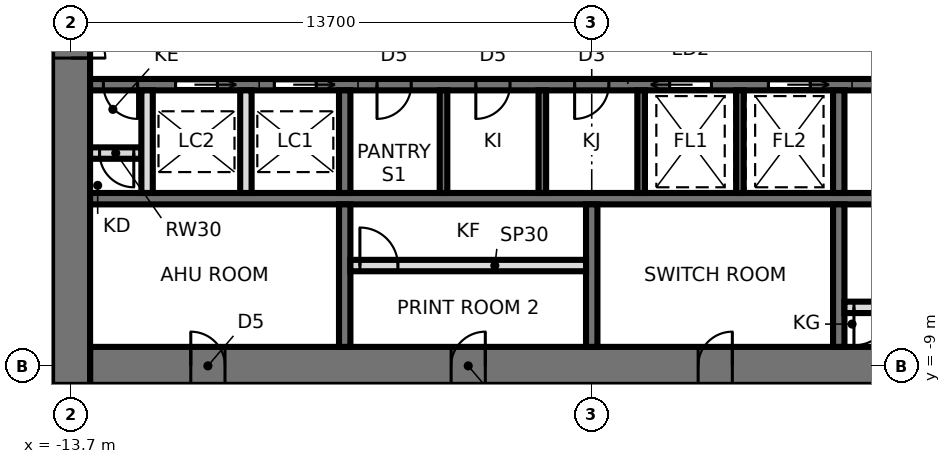
"""IFC4 building model, lengths in metres.
Left out: names, types, materials, properties, quantities, classifications, styles, units other than length and angle.
Written with IfcOpenShell. Run it as: python <this file> out.ifc"""

import sys

from ifc_helpers import new_model, si_unit, direction, frame, frame_2d, origin, place, context, subcontext, project, spatial, rectangle, extrude, element, fill, save


model = new_model("IFC4")
c1 = context("Model", 3, precision=1e-05, world=origin(), true_north=direction((0.0, 1.0)))
c2 = subcontext(c1, "Body", "Model", "MODEL_VIEW")
j1 = project(units=[si_unit("LENGTHUNIT", "METRE"), si_unit("PLANEANGLEUNIT", "RADIAN")], contexts=[c1])
p1 = place(None, origin())
s1 = spatial("IfcSite", under=j1, at=p1, CompositionType="ELEMENT")
p2 = place(p1, origin())
s2 = spatial("IfcBuilding", under=s1, at=p2, CompositionType="ELEMENT")
p3 = place(p2, frame((0.0, 0.0, 176.0)))
s3 = spatial("IfcBuildingStorey", under=s2, at=p3, CompositionType="ELEMENT", Elevation=176.0)
p4 = place(p3, frame((-13.2, -9.0, 0.0), z_axis=(0.0, 0.0, 1.0), x_axis=(1.0, 0.0, 0.0)))
e1 = element("IfcWall", 1, at=p4, inside=s3, PredefinedType="SHEAR", context=c2, shape_type="SweptSolid", body=[
    extrude(rectangle(XDim=26.4, YDim=1.0, at=frame_2d((13.2, 0.0))), origin(), (0.0, 0.0, 1.0), 3.9),
])
p5 = place(p4, frame((2.65, 0.0, 0.0)))
e2 = element("IfcOpeningElement", 2, at=p5, cuts=e1, PredefinedType="OPENING", context=c2, shape_type="SweptSolid", body=[
    extrude(rectangle(XDim=0.9, YDim=2.1, at=frame_2d((0.45, 1.05))), frame((0.0, 0.51, 0.0), z_axis=(0.0, -1.0, 0.0), x_axis=(1.0, 0.0, 0.0)), (0.0, 0.0, 1.0), 1.02),
])
p6 = place(p4, frame((9.5, 0.0, 0.0)))
e3 = element("IfcOpeningElement", 3, at=p6, cuts=e1, PredefinedType="OPENING", context=c2, shape_type="SweptSolid", body=[
    extrude(rectangle(XDim=0.9, YDim=2.1, at=frame_2d((0.45, 1.05))), frame((0.0, 0.51, 0.0), z_axis=(0.0, -1.0, 0.0), x_axis=(1.0, 0.0, 0.0)), (0.0, 0.0, 1.0), 1.02),
])
p7 = place(p4, frame((16.0, 0.0, 0.0)))
e4 = element("IfcOpeningElement", 4, at=p7, cuts=e1, PredefinedType="OPENING", context=c2, shape_type="SweptSolid", body=[
    extrude(rectangle(XDim=0.9, YDim=2.1, at=frame_2d((0.45, 1.05))), frame((0.0, 0.51, 0.0), z_axis=(0.0, -1.0, 0.0), x_axis=(1.0, 0.0, 0.0)), (0.0, 0.0, 1.0), 1.02),
])
p8 = place(p4, frame((22.85, 0.0, 0.0)))
e5 = element("IfcOpeningElement", 5, at=p8, cuts=e1, PredefinedType="OPENING", context=c2, shape_type="SweptSolid", body=[
    extrude(rectangle(XDim=0.9, YDim=2.1, at=frame_2d((0.45, 1.05))), frame((0.0, 0.51, 0.0), z_axis=(0.0, -1.0, 0.0), x_axis=(1.0, 0.0, 0.0)), (0.0, 0.0, 1.0), 1.02),
])
p9 = place(p3, frame((-13.7, 9.5, 0.0), z_axis=(0.0, 0.0, 1.0), x_axis=(0.0, -1.0, 0.0)))
e6 = element("IfcWall", 6, at=p9, inside=s3, PredefinedType="SHEAR", context=c2, shape_type="SweptSolid", body=[
    extrude(rectangle(XDim=19.0, YDim=1.0, at=frame_2d((9.5, 0.0))), origin(), (0.0, 0.0, 1.0), 3.9),
])
p10 = place(p9, frame((8.6, 0.0, 0.0)))
e7 = element("IfcOpeningElement", 7, at=p10, cuts=e6, PredefinedType="OPENING", context=c2, shape_type="SweptSolid", body=[
    extrude(rectangle(XDim=1.8, YDim=2.4, at=frame_2d((0.9, 1.2))), frame((0.0, 0.51, 0.0), z_axis=(0.0, -1.0, 0.0), x_axis=(1.0, 0.0, 0.0)), (0.0, 0.0, 1.0), 1.02),
])
p11 = place(p3, frame((-13.2, -1.6, 0.0), z_axis=(0.0, 0.0, 1.0), x_axis=(1.0, 0.0, 0.0)))
e8 = element("IfcWall", 8, at=p11, inside=s3, PredefinedType="SHEAR", context=c2, shape_type="SweptSolid", body=[
    extrude(rectangle(XDim=26.4, YDim=0.3, at=frame_2d((13.2, 0.0))), origin(), (0.0, 0.0, 1.0), 3.9),
])
p12 = place(p11, frame((25.15, 0.0, 0.0)))
e9 = element("IfcOpeningElement", 9, at=p12, cuts=e8, PredefinedType="OPENING", context=c2, shape_type="SweptSolid", body=[
    extrude(rectangle(XDim=1.0, YDim=2.1, at=frame_2d((0.5, 1.05))), frame((0.0, 0.16, 0.0), z_axis=(0.0, -1.0, 0.0), x_axis=(1.0, 0.0, 0.0)), (0.0, 0.0, 1.0), 0.32),
])
p13 = place(p11, frame((7.55, 0.0, 0.0)))
e10 = element("IfcOpeningElement", 10, at=p13, cuts=e8, PredefinedType="OPENING", context=c2, shape_type="SweptSolid", body=[
    extrude(rectangle(XDim=0.9, YDim=2.1, at=frame_2d((0.45, 1.05))), frame((0.0, 0.16, 0.0), z_axis=(0.0, -1.0, 0.0), x_axis=(1.0, 0.0, 0.0)), (0.0, 0.0, 1.0), 0.32),
])
p14 = place(p11, frame((10.15, 0.0, 0.0)))
e11 = element("IfcOpeningElement", 11, at=p14, cuts=e8, PredefinedType="OPENING", context=c2, shape_type="SweptSolid", body=[
    extrude(rectangle(XDim=0.9, YDim=2.1, at=frame_2d((0.45, 1.05))), frame((0.0, 0.16, 0.0), z_axis=(0.0, -1.0, 0.0), x_axis=(1.0, 0.0, 0.0)), (0.0, 0.0, 1.0), 0.32),
])
p15 = place(p11, frame((12.75, 0.0, 0.0)))
e12 = element("IfcOpeningElement", 12, at=p15, cuts=e8, PredefinedType="OPENING", context=c2, shape_type="SweptSolid", body=[
    extrude(rectangle(XDim=0.9, YDim=2.1, at=frame_2d((0.45, 1.05))), frame((0.0, 0.16, 0.0), z_axis=(0.0, -1.0, 0.0), x_axis=(1.0, 0.0, 0.0)), (0.0, 0.0, 1.0), 0.32),
])
p16 = place(p11, frame((15.25, 0.0, 0.0)))
e13 = element("IfcOpeningElement", 13, at=p16, cuts=e8, PredefinedType="OPENING", context=c2, shape_type="SweptSolid", body=[
    extrude(rectangle(XDim=1.1, YDim=2.3, at=frame_2d((0.55, 1.15))), frame((0.0, 0.16, 0.0), z_axis=(0.0, -1.0, 0.0), x_axis=(1.0, 0.0, 0.0)), (0.0, 0.0, 1.0), 0.32),
])
p17 = place(p11, frame((17.85, 0.0, 0.0)))
e14 = element("IfcOpeningElement", 14, at=p17, cuts=e8, PredefinedType="OPENING", context=c2, shape_type="SweptSolid", body=[
    extrude(rectangle(XDim=1.1, YDim=2.3, at=frame_2d((0.55, 1.15))), frame((0.0, 0.16, 0.0), z_axis=(0.0, -1.0, 0.0), x_axis=(1.0, 0.0, 0.0)), (0.0, 0.0, 1.0), 0.32),
])
p18 = place(p11, frame((4.85, 0.0, 0.0)))
e15 = element("IfcOpeningElement", 15, at=p18, cuts=e8, PredefinedType="OPENING", context=c2, shape_type="SweptSolid", body=[
    extrude(rectangle(XDim=1.1, YDim=2.3, at=frame_2d((0.55, 1.15))), frame((0.0, 0.16, 0.0), z_axis=(0.0, -1.0, 0.0), x_axis=(1.0, 0.0, 0.0)), (0.0, 0.0, 1.0), 0.32),
])
p19 = place(p11, frame((2.25, 0.0, 0.0)))
e16 = element("IfcOpeningElement", 16, at=p19, cuts=e8, PredefinedType="OPENING", context=c2, shape_type="SweptSolid", body=[
    extrude(rectangle(XDim=1.1, YDim=2.3, at=frame_2d((0.55, 1.15))), frame((0.0, 0.16, 0.0), z_axis=(0.0, -1.0, 0.0), x_axis=(1.0, 0.0, 0.0)), (0.0, 0.0, 1.0), 0.32),
])
p20 = place(p11, frame((0.35, 0.0, 0.0)))
e17 = element("IfcOpeningElement", 17, at=p20, cuts=e8, PredefinedType="OPENING", context=c2, shape_type="SweptSolid", body=[
    extrude(rectangle(XDim=0.9, YDim=2.1, at=frame_2d((0.45, 1.05))), frame((0.0, 0.16, 0.0), z_axis=(0.0, -1.0, 0.0), x_axis=(1.0, 0.0, 0.0)), (0.0, 0.0, 1.0), 0.32),
])
p21 = place(p3, frame((-13.2, -4.6, 0.0), z_axis=(0.0, 0.0, 1.0), x_axis=(1.0, 0.0, 0.0)))
e18 = element("IfcWall", 18, at=p21, inside=s3, PredefinedType="SHEAR", context=c2, shape_type="SweptSolid", body=[
    extrude(rectangle(XDim=26.4, YDim=0.3, at=frame_2d((13.2, 0.0))), origin(), (0.0, 0.0, 1.0), 3.9),
])
p22 = place(p3, frame((-6.5, -1.75, 0.0), z_axis=(0.0, 0.0, 1.0), x_axis=(0.0, -1.0, 0.0)))
e19 = element("IfcWall", 19, at=p22, inside=s3, PredefinedType="SHEAR", context=c2, shape_type="SweptSolid", body=[
    extrude(rectangle(XDim=2.7, YDim=0.3, at=frame_2d((1.35, 0.0))), origin(), (0.0, 0.0, 1.0), 3.9),
])
p23 = place(p3, frame((-6.5, -4.75, 0.0), z_axis=(0.0, 0.0, 1.0), x_axis=(0.0, -1.0, 0.0)))
e20 = element("IfcWall", 20, at=p23, inside=s3, PredefinedType="SHEAR", context=c2, shape_type="SweptSolid", body=[
    extrude(rectangle(XDim=3.75, YDim=0.3, at=frame_2d((1.875, 0.0))), origin(), (0.0, 0.0, 1.0), 3.9),
])
p24 = place(p3, frame((6.5, -1.75, 0.0), z_axis=(0.0, 0.0, 1.0), x_axis=(0.0, -1.0, 0.0)))
e21 = element("IfcWall", 21, at=p24, inside=s3, PredefinedType="SHEAR", context=c2, shape_type="SweptSolid", body=[
    extrude(rectangle(XDim=2.7, YDim=0.3, at=frame_2d((1.35, 0.0))), origin(), (0.0, 0.0, 1.0), 3.9),
])
p25 = place(p3, frame((6.5, -4.75, 0.0), z_axis=(0.0, 0.0, 1.0), x_axis=(0.0, -1.0, 0.0)))
e22 = element("IfcWall", 22, at=p25, inside=s3, PredefinedType="SHEAR", context=c2, shape_type="SweptSolid", body=[
    extrude(rectangle(XDim=3.75, YDim=0.3, at=frame_2d((1.875, 0.0))), origin(), (0.0, 0.0, 1.0), 3.9),
])
for number, where, z_axis, x_axis in (
    (23, (-3.9, -1.75, 0.0), (0.0, 0.0, 1.0), (0.0, -1.0, 0.0)),
    (24, (-1.3, -1.75, 0.0), (0.0, 0.0, 1.0), (0.0, -1.0, 0.0)),
    (25, (1.3, -1.75, 0.0), (0.0, 0.0, 1.0), (0.0, -1.0, 0.0)),
    (26, (3.9, -1.75, 0.0), (0.0, 0.0, 1.0), (0.0, -1.0, 0.0)),
):
    element("IfcWall", number, at=place(p3, frame(where, z_axis=z_axis, x_axis=x_axis)), inside=s3, PredefinedType="SHEAR", context=c2, shape_type="SweptSolid", body=[
        extrude(rectangle(XDim=2.7, YDim=0.2, at=frame_2d((1.35, 0.0))), origin(), (0.0, 0.0, 1.0), 3.9),
    ])
p26 = place(p3, frame((0.0, -4.75, 0.0), z_axis=(0.0, 0.0, 1.0), x_axis=(0.0, -1.0, 0.0)))
e27 = element("IfcWall", 27, at=p26, inside=s3, PredefinedType="SHEAR", context=c2, shape_type="SweptSolid", body=[
    extrude(rectangle(XDim=3.75, YDim=0.3, at=frame_2d((1.875, 0.0))), origin(), (0.0, 0.0, 1.0), 3.9),
])
p27 = place(p3, frame((-6.35, -6.36, 0.0), z_axis=(0.0, 0.0, 1.0), x_axis=(1.0, 0.0, 0.0)))
e28 = element("IfcWall", 28, at=p27, inside=s3, PredefinedType="PARTITIONING", context=c2, shape_type="SweptSolid", body=[
    extrude(rectangle(XDim=6.2, YDim=0.3, at=frame_2d((3.1, 0.0))), origin(), (0.0, 0.0, 1.0), 3.74),
])
p28 = place(p27, frame((0.25, 0.0, 0.0)))
e29 = element("IfcOpeningElement", 29, at=p28, cuts=e28, PredefinedType="OPENING", context=c2, shape_type="SweptSolid", body=[
    extrude(rectangle(XDim=1.0, YDim=2.4, at=frame_2d((0.5, 1.2))), frame((0.0, 0.16, 0.0), z_axis=(0.0, -1.0, 0.0), x_axis=(1.0, 0.0, 0.0)), (0.0, 0.0, 1.0), 0.32),
])
p29 = place(p3, frame((6.65, -7.46, 0.0), z_axis=(0.0, 0.0, 1.0), x_axis=(1.0, 0.0, 0.0)))
e30 = element("IfcWall", 30, at=p29, inside=s3, PredefinedType="PARTITIONING", context=c2, shape_type="SweptSolid", body=[
    extrude(rectangle(XDim=6.55, YDim=0.3, at=frame_2d((3.275, 0.0))), origin(), (0.0, 0.0, 1.0), 3.74),
])
p30 = place(p29, frame((0.25, 0.0, 0.0)))
e31 = element("IfcOpeningElement", 31, at=p30, cuts=e30, PredefinedType="OPENING", context=c2, shape_type="SweptSolid", body=[
    extrude(rectangle(XDim=1.0, YDim=2.4, at=frame_2d((0.5, 1.2))), frame((0.0, 0.16, 0.0), z_axis=(0.0, -1.0, 0.0), x_axis=(1.0, 0.0, 0.0)), (0.0, 0.0, 1.0), 0.32),
])
p31 = place(p3, frame((-13.2, -3.4, 0.0), z_axis=(0.0, 0.0, 1.0), x_axis=(1.0, 0.0, 0.0)))
e32 = element("IfcWall", 32, at=p31, inside=s3, PredefinedType="SOLIDWALL", context=c2, shape_type="SweptSolid", body=[
    extrude(rectangle(XDim=1.35, YDim=0.3, at=frame_2d((0.675, 0.0))), origin(), (0.0, 0.0, 1.0), 3.74),
])
p32 = place(p31, frame((0.25, 0.0, 0.0)))
e33 = element("IfcOpeningElement", 33, at=p32, cuts=e32, PredefinedType="OPENING", context=c2, shape_type="SweptSolid", body=[
    extrude(rectangle(XDim=0.9, YDim=2.1, at=frame_2d((0.45, 1.05))), frame((0.0, 0.16, 0.0), z_axis=(0.0, -1.0, 0.0), x_axis=(1.0, 0.0, 0.0)), (0.0, 0.0, 1.0), 0.32),
])
for number, where, z_axis, x_axis in (
    (34, (-9.1, -1.75, 0.0), (0.0, 0.0, 1.0), (0.0, -1.0, 0.0)),
    (35, (-11.7, -1.75, 0.0), (0.0, 0.0, 1.0), (0.0, -1.0, 0.0)),
):
    element("IfcWall", number, at=place(p3, frame(where, z_axis=z_axis, x_axis=x_axis)), inside=s3, PredefinedType="SOLIDWALL", context=c2, shape_type="SweptSolid", body=[
        extrude(rectangle(XDim=2.7, YDim=0.3, at=frame_2d((1.35, 0.0))), origin(), (0.0, 0.0, 1.0), 3.74),
    ])
p33 = place(p10, origin())
e36 = element("IfcDoor", 36, at=p33, inside=s3, OperationType="DOUBLE_DOOR_SINGLE_SWING", PredefinedType="DOOR", context=c2, shape_type="SweptSolid", body=[
    extrude(rectangle(XDim=1.72, YDim=2.36, at=frame_2d((0.9, 1.18))), frame((0.0, 0.025, 0.0), z_axis=(0.0, -1.0, 0.0), x_axis=(1.0, 0.0, 0.0)), (0.0, 0.0, 1.0), 0.05),
    extrude(rectangle(XDim=0.04, YDim=2.4, at=frame_2d((0.02, 1.2))), frame((0.0, 0.25, 0.0), z_axis=(0.0, -1.0, 0.0), x_axis=(1.0, 0.0, 0.0)), (0.0, 0.0, 1.0), 0.5),
    extrude(rectangle(XDim=0.04, YDim=2.4, at=frame_2d((1.78, 1.2))), frame((0.0, 0.25, 0.0), z_axis=(0.0, -1.0, 0.0), x_axis=(1.0, 0.0, 0.0)), (0.0, 0.0, 1.0), 0.5),
    extrude(rectangle(XDim=1.72, YDim=0.04, at=frame_2d((0.9, 2.38))), frame((0.0, 0.25, 0.0), z_axis=(0.0, -1.0, 0.0), x_axis=(1.0, 0.0, 0.0)), (0.0, 0.0, 1.0), 0.5),
])
fill(e7, e36)
p34 = place(p13, frame((0.9, 0.0, 0.0), z_axis=(0.0, 0.0, 1.0), x_axis=(-1.0, 0.0, 0.0)))
e37 = element("IfcDoor", 37, at=p34, inside=s3, OperationType="SINGLE_SWING_RIGHT", PredefinedType="DOOR", context=c2, shape_type="SweptSolid", body=[
    extrude(rectangle(XDim=0.9, YDim=2.1, at=frame_2d((0.45, 1.05))), frame((0.0, 0.025, 0.0), z_axis=(0.0, -1.0, 0.0), x_axis=(1.0, 0.0, 0.0)), (0.0, 0.0, 1.0), 0.05),
])
fill(e10, e37)
p35 = place(p14, frame((0.9, 0.0, 0.0), z_axis=(0.0, 0.0, 1.0), x_axis=(-1.0, 0.0, 0.0)))
e38 = element("IfcDoor", 38, at=p35, inside=s3, OperationType="SINGLE_SWING_RIGHT", PredefinedType="DOOR", context=c2, shape_type="SweptSolid", body=[
    extrude(rectangle(XDim=0.9, YDim=2.1, at=frame_2d((0.45, 1.05))), frame((0.0, 0.025, 0.0), z_axis=(0.0, -1.0, 0.0), x_axis=(1.0, 0.0, 0.0)), (0.0, 0.0, 1.0), 0.05),
])
fill(e11, e38)
p36 = place(p15, frame((0.9, 0.0, 0.0), z_axis=(0.0, 0.0, 1.0), x_axis=(-1.0, 0.0, 0.0)))
e39 = element("IfcDoor", 39, at=p36, inside=s3, OperationType="SINGLE_SWING_RIGHT", PredefinedType="DOOR", context=c2, shape_type="SweptSolid", body=[
    extrude(rectangle(XDim=0.9, YDim=2.1, at=frame_2d((0.45, 1.05))), frame((0.0, 0.025, 0.0), z_axis=(0.0, -1.0, 0.0), x_axis=(1.0, 0.0, 0.0)), (0.0, 0.0, 1.0), 0.05),
])
fill(e12, e39)
p37 = place(p16, frame((1.1, 0.0, 0.0), z_axis=(0.0, 0.0, 1.0), x_axis=(-1.0, 0.0, 0.0)))
e40 = element("IfcDoor", 40, at=p37, inside=s3, OperationType="SLIDING_TO_RIGHT", PredefinedType="DOOR", context=c2, shape_type="SweptSolid", body=[
    extrude(rectangle(XDim=1.1, YDim=2.3, at=frame_2d((0.55, 1.15))), frame((0.0, 0.025, 0.0), z_axis=(0.0, -1.0, 0.0), x_axis=(1.0, 0.0, 0.0)), (0.0, 0.0, 1.0), 0.05),
])
fill(e13, e40)
p38 = place(p17, frame((1.1, 0.0, 0.0), z_axis=(0.0, 0.0, 1.0), x_axis=(-1.0, 0.0, 0.0)))
e41 = element("IfcDoor", 41, at=p38, inside=s3, OperationType="SLIDING_TO_LEFT", PredefinedType="DOOR", context=c2, shape_type="SweptSolid", body=[
    extrude(rectangle(XDim=1.1, YDim=2.3, at=frame_2d((0.55, 1.15))), frame((0.0, 0.025, 0.0), z_axis=(0.0, -1.0, 0.0), x_axis=(1.0, 0.0, 0.0)), (0.0, 0.0, 1.0), 0.05),
])
fill(e14, e41)
p39 = place(p18, frame((1.1, 0.0, 0.0), z_axis=(0.0, 0.0, 1.0), x_axis=(-1.0, 0.0, 0.0)))
e42 = element("IfcDoor", 42, at=p39, inside=s3, OperationType="SLIDING_TO_LEFT", PredefinedType="DOOR", context=c2, shape_type="SweptSolid", body=[
    extrude(rectangle(XDim=1.1, YDim=2.3, at=frame_2d((0.55, 1.15))), frame((0.0, 0.025, 0.0), z_axis=(0.0, -1.0, 0.0), x_axis=(1.0, 0.0, 0.0)), (0.0, 0.0, 1.0), 0.05),
])
fill(e15, e42)
p40 = place(p19, frame((1.1, 0.0, 0.0), z_axis=(0.0, 0.0, 1.0), x_axis=(-1.0, 0.0, 0.0)))
e43 = element("IfcDoor", 43, at=p40, inside=s3, OperationType="SLIDING_TO_LEFT", PredefinedType="DOOR", context=c2, shape_type="SweptSolid", body=[
    extrude(rectangle(XDim=1.1, YDim=2.3, at=frame_2d((0.55, 1.15))), frame((0.0, 0.025, 0.0), z_axis=(0.0, -1.0, 0.0), x_axis=(1.0, 0.0, 0.0)), (0.0, 0.0, 1.0), 0.05),
])
fill(e16, e43)
p41 = place(p20, frame((0.9, 0.0, 0.0), z_axis=(0.0, 0.0, 1.0), x_axis=(-1.0, 0.0, 0.0)))
e44 = element("IfcDoor", 44, at=p41, inside=s3, OperationType="SINGLE_SWING_LEFT", PredefinedType="DOOR", context=c2, shape_type="SweptSolid", body=[
    extrude(rectangle(XDim=0.9, YDim=2.1, at=frame_2d((0.45, 1.05))), frame((0.0, 0.025, 0.0), z_axis=(0.0, -1.0, 0.0), x_axis=(1.0, 0.0, 0.0)), (0.0, 0.0, 1.0), 0.05),
])
fill(e17, e44)
p42 = place(p5, origin())
e45 = element("IfcDoor", 45, at=p42, inside=s3, OperationType="SINGLE_SWING_LEFT", PredefinedType="DOOR", context=c2, shape_type="SweptSolid", body=[
    extrude(rectangle(XDim=0.82, YDim=2.06, at=frame_2d((0.45, 1.03))), frame((0.0, 0.025, 0.0), z_axis=(0.0, -1.0, 0.0), x_axis=(1.0, 0.0, 0.0)), (0.0, 0.0, 1.0), 0.05),
    extrude(rectangle(XDim=0.04, YDim=2.1, at=frame_2d((0.02, 1.05))), frame((0.0, 0.25, 0.0), z_axis=(0.0, -1.0, 0.0), x_axis=(1.0, 0.0, 0.0)), (0.0, 0.0, 1.0), 0.5),
    extrude(rectangle(XDim=0.04, YDim=2.1, at=frame_2d((0.88, 1.05))), frame((0.0, 0.25, 0.0), z_axis=(0.0, -1.0, 0.0), x_axis=(1.0, 0.0, 0.0)), (0.0, 0.0, 1.0), 0.5),
    extrude(rectangle(XDim=0.82, YDim=0.04, at=frame_2d((0.45, 2.08))), frame((0.0, 0.25, 0.0), z_axis=(0.0, -1.0, 0.0), x_axis=(1.0, 0.0, 0.0)), (0.0, 0.0, 1.0), 0.5),
])
fill(e2, e45)
p43 = place(p6, origin())
e46 = element("IfcDoor", 46, at=p43, inside=s3, OperationType="SINGLE_SWING_RIGHT", PredefinedType="DOOR", context=c2, shape_type="SweptSolid", body=[
    extrude(rectangle(XDim=0.82, YDim=2.06, at=frame_2d((0.45, 1.03))), frame((0.0, 0.025, 0.0), z_axis=(0.0, -1.0, 0.0), x_axis=(1.0, 0.0, 0.0)), (0.0, 0.0, 1.0), 0.05),
    extrude(rectangle(XDim=0.04, YDim=2.1, at=frame_2d((0.02, 1.05))), frame((0.0, 0.25, 0.0), z_axis=(0.0, -1.0, 0.0), x_axis=(1.0, 0.0, 0.0)), (0.0, 0.0, 1.0), 0.5),
    extrude(rectangle(XDim=0.04, YDim=2.1, at=frame_2d((0.88, 1.05))), frame((0.0, 0.25, 0.0), z_axis=(0.0, -1.0, 0.0), x_axis=(1.0, 0.0, 0.0)), (0.0, 0.0, 1.0), 0.5),
    extrude(rectangle(XDim=0.82, YDim=0.04, at=frame_2d((0.45, 2.08))), frame((0.0, 0.25, 0.0), z_axis=(0.0, -1.0, 0.0), x_axis=(1.0, 0.0, 0.0)), (0.0, 0.0, 1.0), 0.5),
])
fill(e3, e46)
p44 = place(p7, origin())
e47 = element("IfcDoor", 47, at=p44, inside=s3, OperationType="SINGLE_SWING_RIGHT", PredefinedType="DOOR", context=c2, shape_type="SweptSolid", body=[
    extrude(rectangle(XDim=0.82, YDim=2.06, at=frame_2d((0.45, 1.03))), frame((0.0, 0.025, 0.0), z_axis=(0.0, -1.0, 0.0), x_axis=(1.0, 0.0, 0.0)), (0.0, 0.0, 1.0), 0.05),
    extrude(rectangle(XDim=0.04, YDim=2.1, at=frame_2d((0.02, 1.05))), frame((0.0, 0.25, 0.0), z_axis=(0.0, -1.0, 0.0), x_axis=(1.0, 0.0, 0.0)), (0.0, 0.0, 1.0), 0.5),
    extrude(rectangle(XDim=0.04, YDim=2.1, at=frame_2d((0.88, 1.05))), frame((0.0, 0.25, 0.0), z_axis=(0.0, -1.0, 0.0), x_axis=(1.0, 0.0, 0.0)), (0.0, 0.0, 1.0), 0.5),
    extrude(rectangle(XDim=0.82, YDim=0.04, at=frame_2d((0.45, 2.08))), frame((0.0, 0.25, 0.0), z_axis=(0.0, -1.0, 0.0), x_axis=(1.0, 0.0, 0.0)), (0.0, 0.0, 1.0), 0.5),
])
fill(e4, e47)
p45 = place(p28, origin())
e48 = element("IfcDoor", 48, at=p45, inside=s3, OperationType="SINGLE_SWING_LEFT", PredefinedType="DOOR", context=c2, shape_type="SweptSolid", body=[
    extrude(rectangle(XDim=1.0, YDim=2.4, at=frame_2d((0.5, 1.2))), frame((0.0, 0.025, 0.0), z_axis=(0.0, -1.0, 0.0), x_axis=(1.0, 0.0, 0.0)), (0.0, 0.0, 1.0), 0.05),
])
fill(e29, e48)
p46 = place(p30, frame((1.0, 0.0, 0.0), z_axis=(0.0, 0.0, 1.0), x_axis=(-1.0, 0.0, 0.0)))
e49 = element("IfcDoor", 49, at=p46, inside=s3, OperationType="SINGLE_SWING_RIGHT", PredefinedType="DOOR", context=c2, shape_type="SweptSolid", body=[
    extrude(rectangle(XDim=1.0, YDim=2.4, at=frame_2d((0.5, 1.2))), frame((0.0, 0.025, 0.0), z_axis=(0.0, -1.0, 0.0), x_axis=(1.0, 0.0, 0.0)), (0.0, 0.0, 1.0), 0.05),
])
fill(e31, e49)
p47 = place(p32, frame((0.9, 0.0, 0.0), z_axis=(0.0, 0.0, 1.0), x_axis=(-1.0, 0.0, 0.0)))
e50 = element("IfcDoor", 50, at=p47, inside=s3, OperationType="SINGLE_SWING_LEFT", PredefinedType="DOOR", context=c2, shape_type="SweptSolid", body=[
    extrude(rectangle(XDim=0.9, YDim=2.1, at=frame_2d((0.45, 1.05))), frame((0.0, 0.025, 0.0), z_axis=(0.0, -1.0, 0.0), x_axis=(1.0, 0.0, 0.0)), (0.0, 0.0, 1.0), 0.05),
])
fill(e33, e50)
save(model, sys.argv[1])
